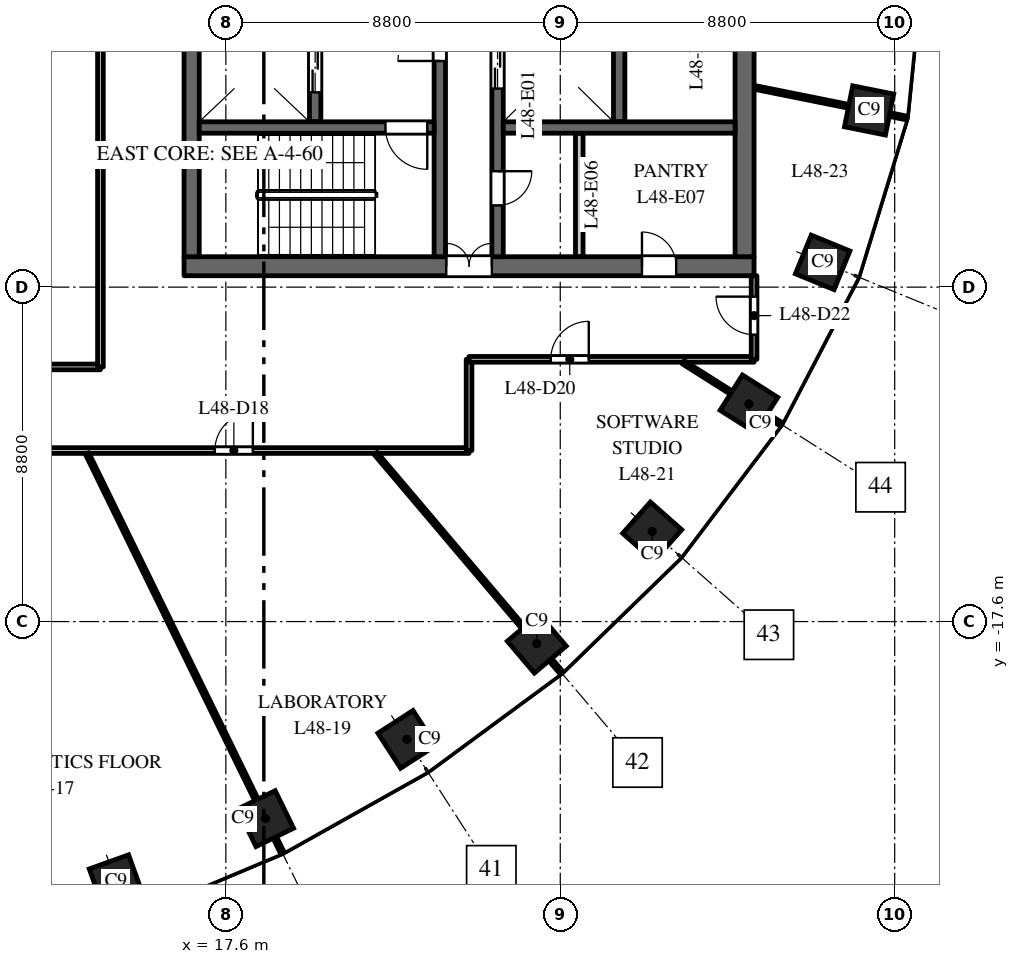
"""IFC4 building model, lengths in metres.
Left out: names, types, materials, properties, quantities, classifications, styles, units other than length and angle.
Written with IfcOpenShell. Run it as: python <this file> out.ifc"""

import sys

from ifc_helpers import new_model, si_unit, direction, frame, frame_2d, origin, origin_2d, place, context, subcontext, project, spatial, rectangle, extrude, element, fill, save


model = new_model("IFC4")
c1 = context("Model", 3, precision=1e-05, world=origin(), true_north=direction((0.0, 1.0)))
c2 = subcontext(c1, "Body", "Model", "MODEL_VIEW")
j1 = project(units=[si_unit("LENGTHUNIT", "METRE"), si_unit("PLANEANGLEUNIT", "RADIAN")], contexts=[c1])
p1 = place(None, origin())
s1 = spatial("IfcSite", under=j1, at=p1, CompositionType="ELEMENT")
p2 = place(p1, origin())
s2 = spatial("IfcBuilding", under=s1, at=p2, CompositionType="ELEMENT")
p3 = place(p2, frame((0.0, 0.0, 233.5)))
s3 = spatial("IfcBuildingStorey", under=s2, at=p3, CompositionType="ELEMENT", Elevation=233.5)
for number, where, z_axis, x_axis in (
    (1, (14.709, -24.441, 0.0), (0.0, 0.0, 1.0), (0.941, 0.338, 0.0)),
    (2, (18.646, -22.785, 0.0), (0.0, 0.0, 1.0), (0.898, 0.439, 0.0)),
    (3, (22.362, -20.7, 0.0), (0.0, 0.0, 1.0), (0.84, 0.542, 0.0)),
    (4, (25.783, -18.18, 0.0), (0.0, 0.0, 1.0), (0.763, 0.646, 0.0)),
    (5, (28.819, -15.23, 0.0), (0.0, 0.0, 1.0), (0.663, 0.749, 0.0)),
    (6, (31.365, -11.871, 0.0), (0.0, 0.0, 1.0), (0.535, 0.845, 0.0)),
    (7, (33.305, -8.149, 0.0), (0.0, 0.0, 1.0), (0.379, 0.925, 0.0)),
    (8, (34.527, -4.151, 0.0), (0.0, 0.0, 1.0), (0.197, 0.98, 0.0)),
):
    element("IfcColumn", number, at=place(p3, frame(where, z_axis=z_axis, x_axis=x_axis)), inside=s3, PredefinedType="COLUMN", context=c2, shape_type="SweptSolid", body=[
        extrude(rectangle(XDim=1.1, YDim=1.1, at=origin_2d()), origin(), (0.0, 0.0, 1.0), 4.0),
    ])
p4 = place(p3, frame((16.5, -8.25, 0.0), z_axis=(0.0, 0.0, 1.0), x_axis=(1.0, 0.0, 0.0)))
e9 = element("IfcWall", 9, at=p4, inside=s3, PredefinedType="SHEAR", context=c2, shape_type="SweptSolid", body=[
    extrude(rectangle(XDim=15.0, YDim=0.5, at=frame_2d((7.5, 0.0))), origin(), (0.0, 0.0, 1.0), 3.7),
])
p5 = place(p4, frame((6.9, 0.0, 0.0)))
e10 = element("IfcOpeningElement", 10, at=p5, cuts=e9, PredefinedType="OPENING", context=c2, shape_type="SweptSolid", body=[
    extrude(rectangle(XDim=1.2, YDim=2.1, at=frame_2d((0.6, 1.05))), frame((0.0, 0.26, 0.0), z_axis=(0.0, -1.0, 0.0), x_axis=(1.0, 0.0, 0.0)), (0.0, 0.0, 1.0), 0.52),
])
p6 = place(p4, frame((12.05, 0.0, 0.0)))
e11 = element("IfcOpeningElement", 11, at=p6, cuts=e9, PredefinedType="OPENING", context=c2, shape_type="SweptSolid", body=[
    extrude(rectangle(XDim=0.9, YDim=2.1, at=frame_2d((0.45, 1.05))), frame((0.0, 0.26, 0.0), z_axis=(0.0, -1.0, 0.0), x_axis=(1.0, 0.0, 0.0)), (0.0, 0.0, 1.0), 0.52),
])
p7 = place(p3, frame((27.95, -4.45, 0.0), z_axis=(0.0, 0.0, 1.0), x_axis=(0.0, 1.0, 0.0)))
e12 = element("IfcWall", 12, at=p7, inside=s3, PredefinedType="SHEAR", context=c2, shape_type="SweptSolid", body=[
    extrude(rectangle(XDim=8.9, YDim=0.3, at=frame_2d((4.45, 0.0))), origin(), (0.0, 0.0, 1.0), 3.7),
])
p8 = place(p3, frame((19.95, -4.45, 0.0), z_axis=(0.0, 0.0, 1.0), x_axis=(0.0, 1.0, 0.0)))
e13 = element("IfcWall", 13, at=p8, inside=s3, PredefinedType="SHEAR", context=c2, shape_type="SweptSolid", body=[
    extrude(rectangle(XDim=8.9, YDim=0.3, at=frame_2d((4.45, 0.0))), origin(), (0.0, 0.0, 1.0), 3.7),
])
p9 = place(p8, frame((0.775, 0.0, 0.0)))
e14 = element("IfcOpeningElement", 14, at=p9, cuts=e13, PredefinedType="OPENING", context=c2, shape_type="SweptSolid", body=[
    extrude(rectangle(XDim=1.2, YDim=2.1, at=frame_2d((0.6, 1.05))), frame((0.0, 0.16, 0.0), z_axis=(0.0, -1.0, 0.0), x_axis=(1.0, 0.0, 0.0)), (0.0, 0.0, 1.0), 0.32),
])
p10 = place(p8, frame((4.675, 0.0, 0.0)))
e15 = element("IfcOpeningElement", 15, at=p10, cuts=e13, PredefinedType="OPENING", context=c2, shape_type="SweptSolid", body=[
    extrude(rectangle(XDim=1.1, YDim=2.1, at=frame_2d((0.55, 1.05))), frame((0.0, 0.16, 0.0), z_axis=(0.0, -1.0, 0.0), x_axis=(1.0, 0.0, 0.0)), (0.0, 0.0, 1.0), 0.32),
])
p11 = place(p8, frame((7.25, 0.0, 0.0)))
e16 = element("IfcOpeningElement", 16, at=p11, cuts=e13, PredefinedType="OPENING", context=c2, shape_type="SweptSolid", body=[
    extrude(rectangle(XDim=1.1, YDim=2.1, at=frame_2d((0.55, 1.05))), frame((0.0, 0.16, 0.0), z_axis=(0.0, -1.0, 0.0), x_axis=(1.0, 0.0, 0.0)), (0.0, 0.0, 1.0), 0.32),
])
p12 = place(p3, frame((24.75, -8.0, 0.0), z_axis=(0.0, 0.0, 1.0), x_axis=(0.0, 1.0, 0.0)))
e17 = element("IfcWall", 17, at=p12, inside=s3, PredefinedType="SHEAR", context=c2, shape_type="SweptSolid", body=[
    extrude(rectangle(XDim=16.0, YDim=0.3, at=frame_2d((8.0, 0.0))), origin(), (0.0, 0.0, 1.0), 3.7),
])
p13 = place(p12, frame((4.425, 0.0, 0.0)))
e18 = element("IfcOpeningElement", 18, at=p13, cuts=e17, PredefinedType="OPENING", context=c2, shape_type="SweptSolid", body=[
    extrude(rectangle(XDim=1.1, YDim=2.1, at=frame_2d((0.55, 1.05))), frame((0.0, 0.16, 0.0), z_axis=(0.0, -1.0, 0.0), x_axis=(1.0, 0.0, 0.0)), (0.0, 0.0, 1.0), 0.32),
])
p14 = place(p12, frame((7.45, 0.0, 0.0)))
e19 = element("IfcOpeningElement", 19, at=p14, cuts=e17, PredefinedType="OPENING", context=c2, shape_type="SweptSolid", body=[
    extrude(rectangle(XDim=1.1, YDim=2.1, at=frame_2d((0.55, 1.05))), frame((0.0, 0.16, 0.0), z_axis=(0.0, -1.0, 0.0), x_axis=(1.0, 0.0, 0.0)), (0.0, 0.0, 1.0), 0.32),
])
p15 = place(p12, frame((10.475, 0.0, 0.0)))
e20 = element("IfcOpeningElement", 20, at=p15, cuts=e17, PredefinedType="OPENING", context=c2, shape_type="SweptSolid", body=[
    extrude(rectangle(XDim=1.1, YDim=2.1, at=frame_2d((0.55, 1.05))), frame((0.0, 0.16, 0.0), z_axis=(0.0, -1.0, 0.0), x_axis=(1.0, 0.0, 0.0)), (0.0, 0.0, 1.0), 0.32),
])
p16 = place(p12, frame((13.75, 0.0, 0.0)))
e21 = element("IfcOpeningElement", 21, at=p16, cuts=e17, PredefinedType="OPENING", context=c2, shape_type="SweptSolid", body=[
    extrude(rectangle(XDim=0.9, YDim=2.1, at=frame_2d((0.45, 1.05))), frame((0.0, 0.16, 0.0), z_axis=(0.0, -1.0, 0.0), x_axis=(1.0, 0.0, 0.0)), (0.0, 0.0, 1.0), 0.32),
])
p17 = place(p12, frame((1.35, 0.0, 0.0)))
e22 = element("IfcOpeningElement", 22, at=p17, cuts=e17, PredefinedType="OPENING", context=c2, shape_type="SweptSolid", body=[
    extrude(rectangle(XDim=0.9, YDim=2.1, at=frame_2d((0.45, 1.05))), frame((0.0, 0.16, 0.0), z_axis=(0.0, -1.0, 0.0), x_axis=(1.0, 0.0, 0.0)), (0.0, 0.0, 1.0), 0.32),
])
p18 = place(p3, frame((16.7, -8.0, 0.0), z_axis=(0.0, 0.0, 1.0), x_axis=(0.0, 1.0, 0.0)))
e23 = element("IfcWall", 23, at=p18, inside=s3, PredefinedType="SHEAR", context=c2, shape_type="SweptSolid", body=[
    extrude(rectangle(XDim=16.0, YDim=0.4, at=frame_2d((8.0, 0.0))), origin(), (0.0, 0.0, 1.0), 3.7),
])
p19 = place(p3, frame((31.25, -8.0, 0.0), z_axis=(0.0, 0.0, 1.0), x_axis=(0.0, 1.0, 0.0)))
e24 = element("IfcWall", 24, at=p19, inside=s3, PredefinedType="SHEAR", context=c2, shape_type="SweptSolid", body=[
    extrude(rectangle(XDim=16.0, YDim=0.5, at=frame_2d((8.0, 0.0))), origin(), (0.0, 0.0, 1.0), 3.7),
])
p20 = place(p3, frame((26.9, -8.0, 0.0), z_axis=(0.0, 0.0, 1.0), x_axis=(0.0, 1.0, 0.0)))
e25 = element("IfcWall", 25, at=p20, inside=s3, PredefinedType="PARTITIONING", context=c2, shape_type="SweptSolid", body=[
    extrude(rectangle(XDim=3.25, YDim=0.2, at=frame_2d((1.625, 0.0))), origin(), (0.0, 0.0, 1.0), 3.7),
])
p21 = place(p3, frame((24.9, -4.6, 0.0), z_axis=(0.0, 0.0, 1.0), x_axis=(1.0, 0.0, 0.0)))
e26 = element("IfcWall", 26, at=p21, inside=s3, PredefinedType="SHEAR", context=c2, shape_type="SweptSolid", body=[
    extrude(rectangle(XDim=6.1, YDim=0.3, at=frame_2d((3.05, 0.0))), origin(), (0.0, 0.0, 1.0), 3.7),
])
p22 = place(p3, frame((23.23, -8.0, 0.0), z_axis=(0.0, 0.0, 1.0), x_axis=(0.0, 1.0, 0.0)))
e27 = element("IfcWall", 27, at=p22, inside=s3, PredefinedType="SHEAR", context=c2, shape_type="SweptSolid", body=[
    extrude(rectangle(XDim=7.875, YDim=0.3, at=frame_2d((3.938, 0.0))), origin(), (0.0, 0.0, 1.0), 3.7),
])
p23 = place(p22, frame((5.15, 0.0, 0.0)))
e28 = element("IfcOpeningElement", 28, at=p23, cuts=e27, PredefinedType="OPENING", context=c2, shape_type="SweptSolid", body=[
    extrude(rectangle(XDim=1.1, YDim=2.1, at=frame_2d((0.55, 1.05))), frame((0.0, 0.16, 0.0), z_axis=(0.0, -1.0, 0.0), x_axis=(1.0, 0.0, 0.0)), (0.0, 0.0, 1.0), 0.32),
])
p24 = place(p3, frame((16.9, -4.6, 0.0), z_axis=(0.0, 0.0, 1.0), x_axis=(1.0, 0.0, 0.0)))
e29 = element("IfcWall", 29, at=p24, inside=s3, PredefinedType="SHEAR", context=c2, shape_type="SweptSolid", body=[
    extrude(rectangle(XDim=6.18, YDim=0.3, at=frame_2d((3.09, 0.0))), origin(), (0.0, 0.0, 1.0), 3.7),
])
p25 = place(p24, frame((4.9, 0.0, 0.0)))
e30 = element("IfcOpeningElement", 30, at=p25, cuts=e29, PredefinedType="OPENING", context=c2, shape_type="SweptSolid", body=[
    extrude(rectangle(XDim=1.1, YDim=2.1, at=frame_2d((0.55, 1.05))), frame((0.0, 0.16, 0.0), z_axis=(0.0, -1.0, 0.0), x_axis=(1.0, 0.0, 0.0)), (0.0, 0.0, 1.0), 0.32),
])
p26 = place(p3, frame((-14.3, -10.9, 0.0), z_axis=(0.0, 0.0, 1.0), x_axis=(1.0, 0.0, 0.0)))
e31 = element("IfcWall", 31, at=p26, inside=s3, PredefinedType="PARTITIONING", context=c2, shape_type="SweptSolid", body=[
    extrude(rectangle(XDim=28.6, YDim=0.15, at=frame_2d((14.3, 0.0))), origin(), (0.0, 0.0, 1.0), 2.85),
])
p27 = place(p26, frame((11.4, 0.0, 0.0)))
e32 = element("IfcOpeningElement", 32, at=p27, cuts=e31, PredefinedType="OPENING", context=c2, shape_type="SweptSolid", body=[
    extrude(rectangle(XDim=1.0, YDim=2.1, at=frame_2d((0.5, 1.05))), frame((0.0, 0.085, 0.0), z_axis=(0.0, -1.0, 0.0), x_axis=(1.0, 0.0, 0.0)), (0.0, 0.0, 1.0), 0.17),
])
p28 = place(p26, frame((16.167, 0.0, 0.0)))
e33 = element("IfcOpeningElement", 33, at=p28, cuts=e31, PredefinedType="OPENING", context=c2, shape_type="SweptSolid", body=[
    extrude(rectangle(XDim=1.0, YDim=2.1, at=frame_2d((0.5, 1.05))), frame((0.0, 0.085, 0.0), z_axis=(0.0, -1.0, 0.0), x_axis=(1.0, 0.0, 0.0)), (0.0, 0.0, 1.0), 0.17),
])
p29 = place(p3, frame((7.524, -13.1, 0.0), z_axis=(0.0, 0.0, 1.0), x_axis=(1.0, 0.0, 0.0)))
e34 = element("IfcWall", 34, at=p29, inside=s3, PredefinedType="PARTITIONING", context=c2, shape_type="SweptSolid", body=[
    extrude(rectangle(XDim=16.476, YDim=0.15, at=frame_2d((8.238, 0.0))), origin(), (0.0, 0.0, 1.0), 2.85),
])
p30 = place(p29, frame((2.633, 0.0, 0.0)))
e35 = element("IfcOpeningElement", 35, at=p30, cuts=e34, PredefinedType="OPENING", context=c2, shape_type="SweptSolid", body=[
    extrude(rectangle(XDim=1.0, YDim=2.1, at=frame_2d((0.5, 1.05))), frame((0.0, 0.085, 0.0), z_axis=(0.0, -1.0, 0.0), x_axis=(1.0, 0.0, 0.0)), (0.0, 0.0, 1.0), 0.17),
])
p31 = place(p29, frame((9.787, 0.0, 0.0)))
e36 = element("IfcOpeningElement", 36, at=p31, cuts=e34, PredefinedType="OPENING", context=c2, shape_type="SweptSolid", body=[
    extrude(rectangle(XDim=1.0, YDim=2.1, at=frame_2d((0.5, 1.05))), frame((0.0, 0.085, 0.0), z_axis=(0.0, -1.0, 0.0), x_axis=(1.0, 0.0, 0.0)), (0.0, 0.0, 1.0), 0.17),
])
p32 = place(p3, frame((13.948, -13.175, 0.0), z_axis=(0.0, 0.0, 1.0), x_axis=(0.439190294188, -0.898394059136, 0.0)))
e37 = element("IfcWall", 37, at=p32, inside=s3, PredefinedType="PARTITIONING", context=c2, shape_type="SweptSolid", body=[
    extrude(rectangle(XDim=11.699, YDim=0.1, at=frame_2d((5.849, 0.0))), origin(), (0.0, 0.0, 1.0), 3.0),
])
p33 = place(p3, frame((14.3, -10.9, 0.0), z_axis=(0.0, 0.0, 1.0), x_axis=(0.0, 1.0, 0.0)))
e38 = element("IfcWall", 38, at=p33, inside=s3, PredefinedType="PARTITIONING", context=c2, shape_type="SweptSolid", body=[
    extrude(rectangle(XDim=21.8, YDim=0.15, at=frame_2d((10.9, 0.0))), origin(), (0.0, 0.0, 1.0), 2.75),
])
p34 = place(p33, frame((10.4, 0.0, 0.0)))
e39 = element("IfcOpeningElement", 39, at=p34, cuts=e38, PredefinedType="OPENING", context=c2, shape_type="SweptSolid", body=[
    extrude(rectangle(XDim=1.0, YDim=2.1, at=frame_2d((0.5, 1.05))), frame((0.0, 0.085, 0.0), z_axis=(0.0, -1.0, 0.0), x_axis=(1.0, 0.0, 0.0)), (0.0, 0.0, 1.0), 0.17),
])
p35 = place(p3, frame((21.542, -13.175, 0.0), z_axis=(0.0, 0.0, 1.0), x_axis=(0.646374865928, -0.763020008058, 0.0)))
e40 = element("IfcWall", 40, at=p35, inside=s3, PredefinedType="PARTITIONING", context=c2, shape_type="SweptSolid", body=[
    extrude(rectangle(XDim=7.562, YDim=0.1, at=frame_2d((3.781, 0.0))), origin(), (0.0, 0.0, 1.0), 3.0),
])
p36 = place(p3, frame((24.0, -13.1, 0.0), z_axis=(0.0, 0.0, 1.0), x_axis=(0.0, 1.0, 0.0)))
e41 = element("IfcWall", 41, at=p36, inside=s3, PredefinedType="PARTITIONING", context=c2, shape_type="SweptSolid", body=[
    extrude(rectangle(XDim=2.4, YDim=0.15, at=frame_2d((1.2, 0.0))), origin(), (0.0, 0.0, 1.0), 2.75),
])
p37 = place(p3, frame((24.0, -10.7, 0.0), z_axis=(0.0, 0.0, 1.0), x_axis=(1.0, 0.0, 0.0)))
e42 = element("IfcWall", 42, at=p37, inside=s3, PredefinedType="PARTITIONING", context=c2, shape_type="SweptSolid", body=[
    extrude(rectangle(XDim=7.5, YDim=0.15, at=frame_2d((3.75, 0.0))), origin(), (0.0, 0.0, 1.0), 3.0),
])
p38 = place(p37, frame((2.15, 0.0, 0.0)))
e43 = element("IfcOpeningElement", 43, at=p38, cuts=e42, PredefinedType="OPENING", context=c2, shape_type="SweptSolid", body=[
    extrude(rectangle(XDim=1.0, YDim=2.1, at=frame_2d((0.5, 1.05))), frame((0.0, 0.085, 0.0), z_axis=(0.0, -1.0, 0.0), x_axis=(1.0, 0.0, 0.0)), (0.0, 0.0, 1.0), 0.17),
])
p39 = place(p3, frame((29.637, -10.777, 0.0), z_axis=(0.0, 0.0, 1.0), x_axis=(0.844810627195, -0.535065420467, 0.0)))
e44 = element("IfcWall", 44, at=p39, inside=s3, PredefinedType="PARTITIONING", context=c2, shape_type="SweptSolid", body=[
    extrude(rectangle(XDim=3.048, YDim=0.1, at=frame_2d((1.524, 0.0))), origin(), (0.0, 0.0, 1.0), 3.0),
])
p40 = place(p3, frame((31.5, -10.7, 0.0), z_axis=(0.0, 0.0, 1.0), x_axis=(0.0, 1.0, 0.0)))
e45 = element("IfcWall", 45, at=p40, inside=s3, PredefinedType="PARTITIONING", context=c2, shape_type="SweptSolid", body=[
    extrude(rectangle(XDim=2.2, YDim=0.15, at=frame_2d((1.1, 0.0))), origin(), (0.0, 0.0, 1.0), 3.0),
])
p41 = place(p40, frame((0.65, 0.0, 0.0)))
e46 = element("IfcOpeningElement", 46, at=p41, cuts=e45, PredefinedType="OPENING", context=c2, shape_type="SweptSolid", body=[
    extrude(rectangle(XDim=1.0, YDim=2.1, at=frame_2d((0.5, 1.05))), frame((0.0, 0.085, 0.0), z_axis=(0.0, -1.0, 0.0), x_axis=(1.0, 0.0, 0.0)), (0.0, 0.0, 1.0), 0.17),
])
p42 = place(p3, frame((31.5, -3.542, 0.0), z_axis=(0.0, 0.0, 1.0), x_axis=(0.980357474535, -0.197228857227, 0.0)))
e47 = element("IfcWall", 47, at=p42, inside=s3, PredefinedType="PARTITIONING", context=c2, shape_type="SweptSolid", body=[
    extrude(rectangle(XDim=4.092, YDim=0.1, at=frame_2d((2.046, 0.0))), origin(), (0.0, 0.0, 1.0), 3.0),
])
p43 = place(p9, origin())
e48 = element("IfcDoor", 48, at=p43, inside=s3, OperationType="DOUBLE_DOOR_SLIDING", PredefinedType="DOOR", context=c2, shape_type="SweptSolid", body=[
    extrude(rectangle(XDim=1.2, YDim=2.1, at=frame_2d((0.6, 1.05))), frame((0.0, 0.025, 0.0), z_axis=(0.0, -1.0, 0.0), x_axis=(1.0, 0.0, 0.0)), (0.0, 0.0, 1.0), 0.05),
])
fill(e14, e48)
p44 = place(p13, origin())
e49 = element("IfcDoor", 49, at=p44, inside=s3, OperationType="DOUBLE_DOOR_SLIDING", PredefinedType="DOOR", context=c2, shape_type="SweptSolid", body=[
    extrude(rectangle(XDim=1.1, YDim=2.1, at=frame_2d((0.55, 1.05))), frame((0.0, 0.025, 0.0), z_axis=(0.0, -1.0, 0.0), x_axis=(1.0, 0.0, 0.0)), (0.0, 0.0, 1.0), 0.05),
])
fill(e18, e49)
p45 = place(p25, origin())
e50 = element("IfcDoor", 50, at=p45, inside=s3, OperationType="SINGLE_SWING_RIGHT", PredefinedType="DOOR", context=c2, shape_type="SweptSolid", body=[
    extrude(rectangle(XDim=1.1, YDim=2.1, at=frame_2d((0.55, 1.05))), frame((0.0, 0.025, 0.0), z_axis=(0.0, -1.0, 0.0), x_axis=(1.0, 0.0, 0.0)), (0.0, 0.0, 1.0), 0.05),
])
fill(e30, e50)
p46 = place(p23, origin())
e51 = element("IfcDoor", 51, at=p46, inside=s3, OperationType="SINGLE_SWING_RIGHT", PredefinedType="DOOR", context=c2, shape_type="SweptSolid", body=[
    extrude(rectangle(XDim=1.1, YDim=2.1, at=frame_2d((0.55, 1.05))), frame((0.0, 0.025, 0.0), z_axis=(0.0, -1.0, 0.0), x_axis=(1.0, 0.0, 0.0)), (0.0, 0.0, 1.0), 0.05),
])
fill(e28, e51)
p47 = place(p5, origin())
e52 = element("IfcDoor", 52, at=p47, inside=s3, OperationType="DOUBLE_DOOR_DOUBLE_SWING", PredefinedType="DOOR", context=c2, shape_type="SweptSolid", body=[
    extrude(rectangle(XDim=1.2, YDim=2.1, at=frame_2d((0.6, 1.05))), frame((0.0, 0.025, 0.0), z_axis=(0.0, -1.0, 0.0), x_axis=(1.0, 0.0, 0.0)), (0.0, 0.0, 1.0), 0.05),
])
fill(e10, e52)
p48 = place(p17, origin())
e53 = element("IfcDoor", 53, at=p48, inside=s3, OperationType="SINGLE_SWING_RIGHT", PredefinedType="DOOR", context=c2, shape_type="SweptSolid", body=[
    extrude(rectangle(XDim=0.9, YDim=2.1, at=frame_2d((0.45, 1.05))), frame((0.0, 0.025, 0.0), z_axis=(0.0, -1.0, 0.0), x_axis=(1.0, 0.0, 0.0)), (0.0, 0.0, 1.0), 0.05),
])
fill(e22, e53)
p49 = place(p6, origin())
e54 = element("IfcDoor", 54, at=p49, inside=s3, OperationType="SINGLE_SWING_RIGHT", PredefinedType="DOOR", context=c2, shape_type="SweptSolid", body=[
    extrude(rectangle(XDim=0.9, YDim=2.1, at=frame_2d((0.45, 1.05))), frame((0.0, 0.025, 0.0), z_axis=(0.0, -1.0, 0.0), x_axis=(1.0, 0.0, 0.0)), (0.0, 0.0, 1.0), 0.05),
])
fill(e11, e54)
p50 = place(p31, origin())
e55 = element("IfcDoor", 55, at=p50, inside=s3, OperationType="SINGLE_SWING_RIGHT", PredefinedType="DOOR", context=c2, shape_type="SweptSolid", body=[
    extrude(rectangle(XDim=1.0, YDim=2.1, at=frame_2d((0.5, 1.05))), frame((0.0, 0.025, 0.0), z_axis=(0.0, -1.0, 0.0), x_axis=(1.0, 0.0, 0.0)), (0.0, 0.0, 1.0), 0.05),
])
fill(e36, e55)
p51 = place(p38, origin())
e56 = element("IfcDoor", 56, at=p51, inside=s3, OperationType="SINGLE_SWING_RIGHT", PredefinedType="DOOR", context=c2, shape_type="SweptSolid", body=[
    extrude(rectangle(XDim=1.0, YDim=2.1, at=frame_2d((0.5, 1.05))), frame((0.0, 0.025, 0.0), z_axis=(0.0, -1.0, 0.0), x_axis=(1.0, 0.0, 0.0)), (0.0, 0.0, 1.0), 0.05),
])
fill(e43, e56)
p52 = place(p41, origin())
e57 = element("IfcDoor", 57, at=p52, inside=s3, OperationType="SINGLE_SWING_RIGHT", PredefinedType="DOOR", context=c2, shape_type="SweptSolid", body=[
    extrude(rectangle(XDim=1.0, YDim=2.1, at=frame_2d((0.5, 1.05))), frame((0.0, 0.025, 0.0), z_axis=(0.0, -1.0, 0.0), x_axis=(1.0, 0.0, 0.0)), (0.0, 0.0, 1.0), 0.05),
])
fill(e46, e57)
save(model, sys.argv[1])
